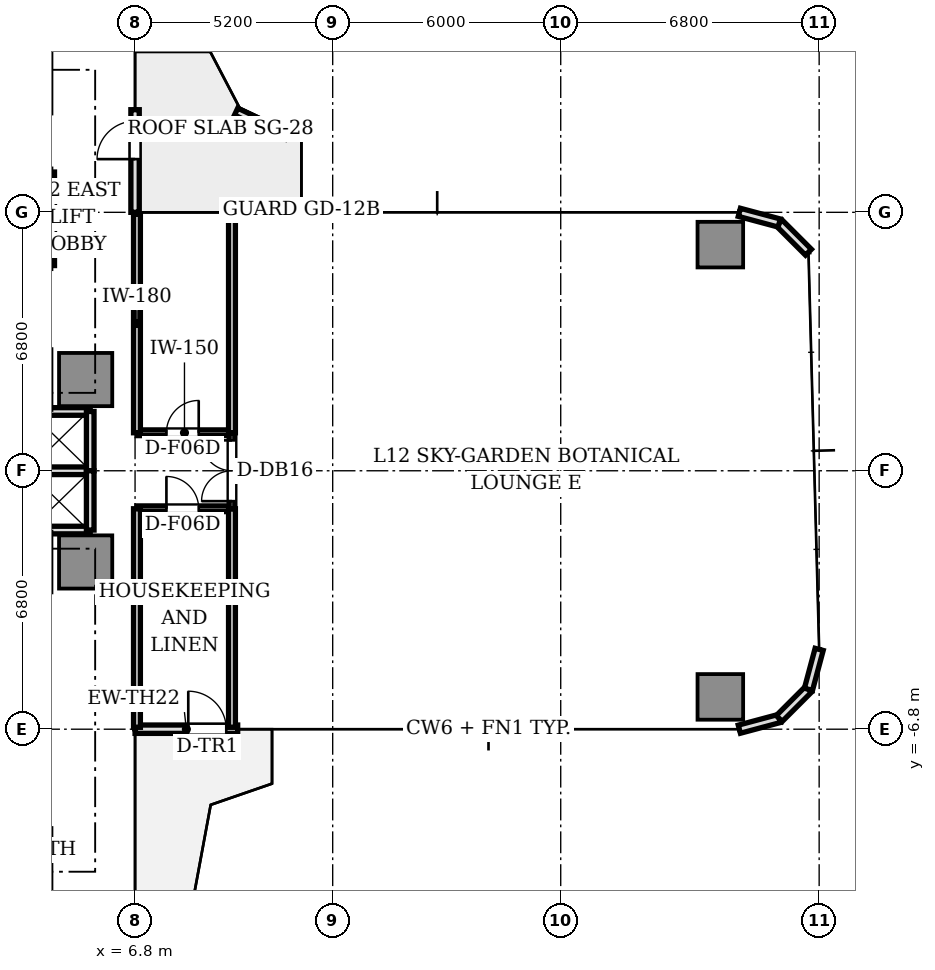
"""IFC4 building model, lengths in metres.
Left out: names, types, materials, properties, quantities, classifications, styles, units other than length and angle.
Written with IfcOpenShell. Run it as: python <this file> out.ifc"""

import sys

from ifc_helpers import new_model, si_unit, direction, frame, frame_2d, origin, origin_2d, place, context, subcontext, project, spatial, rectangle, extrude, source, transform, mapped, element, fill, save


model = new_model("IFC4")
c1 = context("Model", 3, precision=1e-05, world=origin(), true_north=direction((0.0, 1.0)))
c2 = subcontext(c1, "Body", "Model", "MODEL_VIEW")
j1 = project(units=[si_unit("LENGTHUNIT", "METRE"), si_unit("PLANEANGLEUNIT", "RADIAN")], contexts=[c1])
p1 = place(None, origin())
s1 = spatial("IfcSite", under=j1, at=p1, CompositionType="ELEMENT")
p2 = place(p1, origin())
s2 = spatial("IfcBuilding", under=s1, at=p2, CompositionType="ELEMENT")
p3 = place(p2, frame((0.0, 0.0, 46.55)))
s3 = spatial("IfcBuildingStorey", under=s2, at=p3, CompositionType="ELEMENT", Elevation=46.55)
m1 = source(origin(), c2, "Body", "SweptSolid", [
    extrude(rectangle(XDim=1.4, YDim=1.4, at=origin_2d()), origin(), (0.0, 0.0, 1.0), 4.26),
])
for number, where, z_axis, x_axis in (
    (1, (5.5, 2.4, 0.0), (0.0, 0.0, 1.0), (1.0, 0.0, 0.0)),
    (2, (5.5, -2.4, 0.0), (0.0, 0.0, 1.0), (1.0, 0.0, 0.0)),
):
    element("IfcColumn", number, at=place(p3, frame(where, z_axis=z_axis, x_axis=x_axis)), inside=s3, PredefinedType="COLUMN", context=c2, shape_type="MappedRepresentation", body=[
        mapped(m1, transform((0.0, 0.0, 0.0), scale=1.0)),
    ])
m2 = source(origin(), c2, "Body", "SweptSolid", [
    extrude(rectangle(XDim=1.2, YDim=1.2, at=origin_2d()), origin(), (0.0, 0.0, 1.0), 4.26),
])
for number, where, z_axis, x_axis in (
    (3, (22.2, -5.95, 0.0), (0.0, 0.0, 1.0), (1.0, 0.0, 0.0)),
    (4, (22.2, 5.95, 0.0), (0.0, 0.0, 1.0), (1.0, 0.0, 0.0)),
):
    element("IfcColumn", number, at=place(p3, frame(where, z_axis=z_axis, x_axis=x_axis)), inside=s3, PredefinedType="COLUMN", context=c2, shape_type="MappedRepresentation", body=[
        mapped(m2, transform((0.0, 0.0, 0.0), scale=1.0)),
    ])
p4 = place(p3, frame((6.8, -6.8, 0.0), z_axis=(0.0, 0.0, 1.0), x_axis=(1.0, 0.0, 0.0)))
e5 = element("IfcWall", 5, at=p4, inside=s3, PredefinedType="STANDARD", context=c2, shape_type="SweptSolid", body=[
    extrude(rectangle(XDim=2.7, YDim=0.22, at=frame_2d((1.35, 0.0))), origin(), (0.0, 0.0, 1.0), 4.26),
])
p5 = place(p4, frame((1.4, 0.0, 0.0)))
e6 = element("IfcOpeningElement", 6, at=p5, cuts=e5, PredefinedType="OPENING", context=c2, shape_type="SweptSolid", body=[
    extrude(rectangle(XDim=1.0, YDim=2.2, at=frame_2d((0.5, 1.1))), frame((0.0, 0.12, 0.0), z_axis=(0.0, -1.0, 0.0), x_axis=(1.0, 0.0, 0.0)), (0.0, 0.0, 1.0), 0.24),
])
for number, where, z_axis, x_axis in (
    (7, (22.7, -6.8, 0.0), (0.0, 0.0, 1.0), (0.966, 0.259, 0.0)),
    (8, (23.75, -6.519, 0.0), (0.0, 0.0, 1.0), (0.707, 0.707, 0.0)),
    (9, (24.519, -5.75, 0.0), (0.0, 0.0, 1.0), (0.259, 0.966, 0.0)),
    (10, (24.519, 5.75, 0.0), (0.0, 0.0, 1.0), (-0.707, 0.707, 0.0)),
    (11, (23.75, 6.519, 0.0), (0.0, 0.0, 1.0), (-0.966, 0.259, 0.0)),
):
    element("IfcWall", number, at=place(p3, frame(where, z_axis=z_axis, x_axis=x_axis)), inside=s3, PredefinedType="STANDARD", context=c2, shape_type="SweptSolid", body=[
        extrude(rectangle(XDim=1.087, YDim=0.22, at=frame_2d((0.543, 0.0))), origin(), (0.0, 0.0, 1.0), 4.26),
    ])
p6 = place(p3, frame((6.8, 6.8, 0.0), z_axis=(0.0, 0.0, 1.0), x_axis=(0.0, 1.0, 0.0)))
e12 = element("IfcWall", 12, at=p6, inside=s3, PredefinedType="STANDARD", context=c2, shape_type="SweptSolid", body=[
    extrude(rectangle(XDim=2.7, YDim=0.22, at=frame_2d((1.35, 0.0))), origin(), (0.0, 0.0, 1.0), 4.26),
])
p7 = place(p6, frame((1.4, 0.0, 0.0)))
e13 = element("IfcOpeningElement", 13, at=p7, cuts=e12, PredefinedType="OPENING", context=c2, shape_type="SweptSolid", body=[
    extrude(rectangle(XDim=1.0, YDim=2.2, at=frame_2d((0.5, 1.1))), frame((0.0, 0.12, 0.0), z_axis=(0.0, -1.0, 0.0), x_axis=(1.0, 0.0, 0.0)), (0.0, 0.0, 1.0), 0.24),
])
p8 = place(p3, frame((10.794, 8.819, 0.0), z_axis=(0.0, 0.0, 1.0), x_axis=(-0.903909527408, 0.42772370318, 0.0)))
e14 = element("IfcWall", 14, at=p8, inside=s3, PredefinedType="PARAPET", context=c2, shape_type="SweptSolid", body=[
    extrude(rectangle(XDim=1.476, YDim=0.2, at=frame_2d((0.738, 0.0))), origin(), (0.0, 0.0, 1.0), 0.65),
])
for number, where, z_axis, x_axis in (
    (15, (3.98, 1.56, 0.0), (0.0, 0.0, 1.0), (1.0, 0.0, 0.0)),
    (16, (3.98, -1.56, 0.0), (0.0, 0.0, 1.0), (1.0, 0.0, 0.0)),
    (17, (3.98, 0.0, 0.0), (0.0, 0.0, 1.0), (1.0, 0.0, 0.0)),
):
    element("IfcWall", number, at=place(p3, frame(where, z_axis=z_axis, x_axis=x_axis)), inside=s3, PredefinedType="SOLIDWALL", context=c2, shape_type="SweptSolid", body=[
        extrude(rectangle(XDim=1.64, YDim=0.2, at=frame_2d((0.82, 0.0))), origin(), (0.0, 0.0, 1.0), 3.81),
    ])
for number, where, z_axis, x_axis in (
    (18, (5.62, 0.0, 0.0), (0.0, 0.0, 1.0), (0.0, 1.0, 0.0)),
    (19, (5.62, -1.56, 0.0), (0.0, 0.0, 1.0), (0.0, 1.0, 0.0)),
):
    element("IfcWall", number, at=place(p3, frame(where, z_axis=z_axis, x_axis=x_axis)), inside=s3, PredefinedType="SOLIDWALL", context=c2, shape_type="SweptSolid", body=[
        extrude(rectangle(XDim=1.56, YDim=0.2, at=frame_2d((0.78, 0.0))), origin(), (0.0, 0.0, 1.0), 3.81),
    ])
p9 = place(p3, frame((4.58, 5.4, 0.0), z_axis=(0.0, 0.0, 1.0), x_axis=(0.0, 1.0, 0.0)))
e20 = element("IfcWall", 20, at=p9, inside=s3, PredefinedType="SOLIDWALL", context=c2, shape_type="SweptSolid", body=[
    extrude(rectangle(XDim=2.46, YDim=0.2, at=frame_2d((1.23, 0.0))), origin(), (0.0, 0.0, 1.0), 3.81),
])
p10 = place(p9, frame((0.2, 0.0, 0.0)))
e21 = element("IfcOpeningElement", 21, at=p10, cuts=e20, PredefinedType="OPENING", context=c2, shape_type="SweptSolid", body=[
    extrude(rectangle(XDim=0.85, YDim=2.1, at=frame_2d((0.425, 1.05))), frame((0.0, 0.11, 0.0), z_axis=(0.0, -1.0, 0.0), x_axis=(1.0, 0.0, 0.0)), (0.0, 0.0, 1.0), 0.22),
])
p11 = place(p9, frame((1.38, 0.0, 0.0)))
e22 = element("IfcOpeningElement", 22, at=p11, cuts=e20, PredefinedType="OPENING", context=c2, shape_type="SweptSolid", body=[
    extrude(rectangle(XDim=0.85, YDim=2.1, at=frame_2d((0.425, 1.05))), frame((0.0, 0.11, 0.0), z_axis=(0.0, -1.0, 0.0), x_axis=(1.0, 0.0, 0.0)), (0.0, 0.0, 1.0), 0.22),
])
p12 = place(p3, frame((6.85, 1.0, 0.0), z_axis=(0.0, 0.0, 1.0), x_axis=(1.0, 0.0, 0.0)))
e23 = element("IfcWall", 23, at=p12, inside=s3, PredefinedType="PARTITIONING", context=c2, shape_type="SweptSolid", body=[
    extrude(rectangle(XDim=2.5, YDim=0.15, at=frame_2d((1.25, 0.0))), origin(), (0.0, 0.0, 1.0), 3.81),
])
p13 = place(p12, frame((0.775, 0.0, 0.0)))
e24 = element("IfcOpeningElement", 24, at=p13, cuts=e23, PredefinedType="OPENING", context=c2, shape_type="SweptSolid", body=[
    extrude(rectangle(XDim=0.85, YDim=2.1, at=frame_2d((0.425, 1.05))), frame((0.0, 0.085, 0.0), z_axis=(0.0, -1.0, 0.0), x_axis=(1.0, 0.0, 0.0)), (0.0, 0.0, 1.0), 0.17),
])
p14 = place(p3, frame((6.85, -1.0, 0.0), z_axis=(0.0, 0.0, 1.0), x_axis=(1.0, 0.0, 0.0)))
e25 = element("IfcWall", 25, at=p14, inside=s3, PredefinedType="PARTITIONING", context=c2, shape_type="SweptSolid", body=[
    extrude(rectangle(XDim=2.5, YDim=0.15, at=frame_2d((1.25, 0.0))), origin(), (0.0, 0.0, 1.0), 3.81),
])
p15 = place(p14, frame((0.775, 0.0, 0.0)))
e26 = element("IfcOpeningElement", 26, at=p15, cuts=e25, PredefinedType="OPENING", context=c2, shape_type="SweptSolid", body=[
    extrude(rectangle(XDim=0.85, YDim=2.1, at=frame_2d((0.425, 1.05))), frame((0.0, 0.085, 0.0), z_axis=(0.0, -1.0, 0.0), x_axis=(1.0, 0.0, 0.0)), (0.0, 0.0, 1.0), 0.17),
])
for number, where, z_axis, x_axis in (
    (27, (6.85, 1.0, 0.0), (0.0, 0.0, 1.0), (0.0, 1.0, 0.0)),
    (28, (6.85, -6.75, 0.0), (0.0, 0.0, 1.0), (0.0, 1.0, 0.0)),
    (29, (9.35, -1.0, 0.0), (0.0, 0.0, 1.0), (0.0, -1.0, 0.0)),
    (30, (9.35, 1.0, 0.0), (0.0, 0.0, 1.0), (0.0, 1.0, 0.0)),
):
    element("IfcWall", number, at=place(p3, frame(where, z_axis=z_axis, x_axis=x_axis)), inside=s3, PredefinedType="PARTITIONING", context=c2, shape_type="SweptSolid", body=[
        extrude(rectangle(XDim=5.75, YDim=0.18, at=frame_2d((2.875, 0.0))), origin(), (0.0, 0.0, 1.0), 3.81),
    ])
p16 = place(p3, frame((9.35, -1.0, 0.0), z_axis=(0.0, 0.0, 1.0), x_axis=(0.0, 1.0, 0.0)))
e31 = element("IfcWall", 31, at=p16, inside=s3, PredefinedType="PARTITIONING", context=c2, shape_type="SweptSolid", body=[
    extrude(rectangle(XDim=2.0, YDim=0.15, at=frame_2d((1.0, 0.0))), origin(), (0.0, 0.0, 1.0), 3.81),
])
p17 = place(p16, frame((0.2, 0.0, 0.0)))
e32 = element("IfcOpeningElement", 32, at=p17, cuts=e31, PredefinedType="OPENING", context=c2, shape_type="SweptSolid", body=[
    extrude(rectangle(XDim=1.6, YDim=2.25, at=frame_2d((0.8, 1.125))), frame((0.0, 0.085, 0.0), z_axis=(0.0, -1.0, 0.0), x_axis=(1.0, 0.0, 0.0)), (0.0, 0.0, 1.0), 0.17),
])
m3 = source(origin(), c2, "Body", "SweptSolid", [
    extrude(rectangle(XDim=1.0, YDim=0.05, at=origin_2d()), origin(), (0.0, 0.0, 1.0), 2.2),
])
p18 = place(p5, frame((0.5, 0.0, 0.0)))
e33 = element("IfcDoor", 33, at=p18, inside=s3, OperationType="SINGLE_SWING_LEFT", PredefinedType="DOOR", context=c2, shape_type="MappedRepresentation", body=[
    mapped(m3, transform((0.0, 0.0, 0.0), scale=1.0)),
])
fill(e6, e33)
p19 = place(p7, frame((0.5, 0.0, 0.0)))
e34 = element("IfcDoor", 34, at=p19, inside=s3, OperationType="SINGLE_SWING_LEFT", PredefinedType="DOOR", context=c2, shape_type="MappedRepresentation", body=[
    mapped(m3, transform((0.0, 0.0, 0.0), scale=1.0)),
])
fill(e13, e34)
m4 = source(origin(), c2, "Body", "SweptSolid", [
    extrude(rectangle(XDim=0.85, YDim=0.05, at=origin_2d()), origin(), (0.0, 0.0, 1.0), 2.1),
])
p20 = place(p15, frame((0.425, 0.0, 0.0)))
e35 = element("IfcDoor", 35, at=p20, inside=s3, OperationType="SINGLE_SWING_LEFT", PredefinedType="DOOR", context=c2, shape_type="MappedRepresentation", body=[
    mapped(m4, transform((0.0, 0.0, 0.0), scale=1.0)),
])
fill(e26, e35)
p21 = place(p13, frame((0.425, 0.0, 0.0)))
e36 = element("IfcDoor", 36, at=p21, inside=s3, OperationType="SINGLE_SWING_RIGHT", PredefinedType="DOOR", context=c2, shape_type="MappedRepresentation", body=[
    mapped(m4, transform((0.0, 0.0, 0.0), scale=1.0)),
])
fill(e24, e36)
m5 = source(origin(), c2, "Body", "SweptSolid", [
    extrude(rectangle(XDim=1.6, YDim=0.05, at=origin_2d()), origin(), (0.0, 0.0, 1.0), 2.25),
])
p22 = place(p17, frame((0.8, 0.0, 0.0)))
e37 = element("IfcDoor", 37, at=p22, inside=s3, OperationType="DOUBLE_DOOR_SINGLE_SWING", PredefinedType="DOOR", context=c2, shape_type="MappedRepresentation", body=[
    mapped(m5, transform((0.0, 0.0, 0.0), scale=1.0)),
])
fill(e32, e37)
save(model, sys.argv[1])
